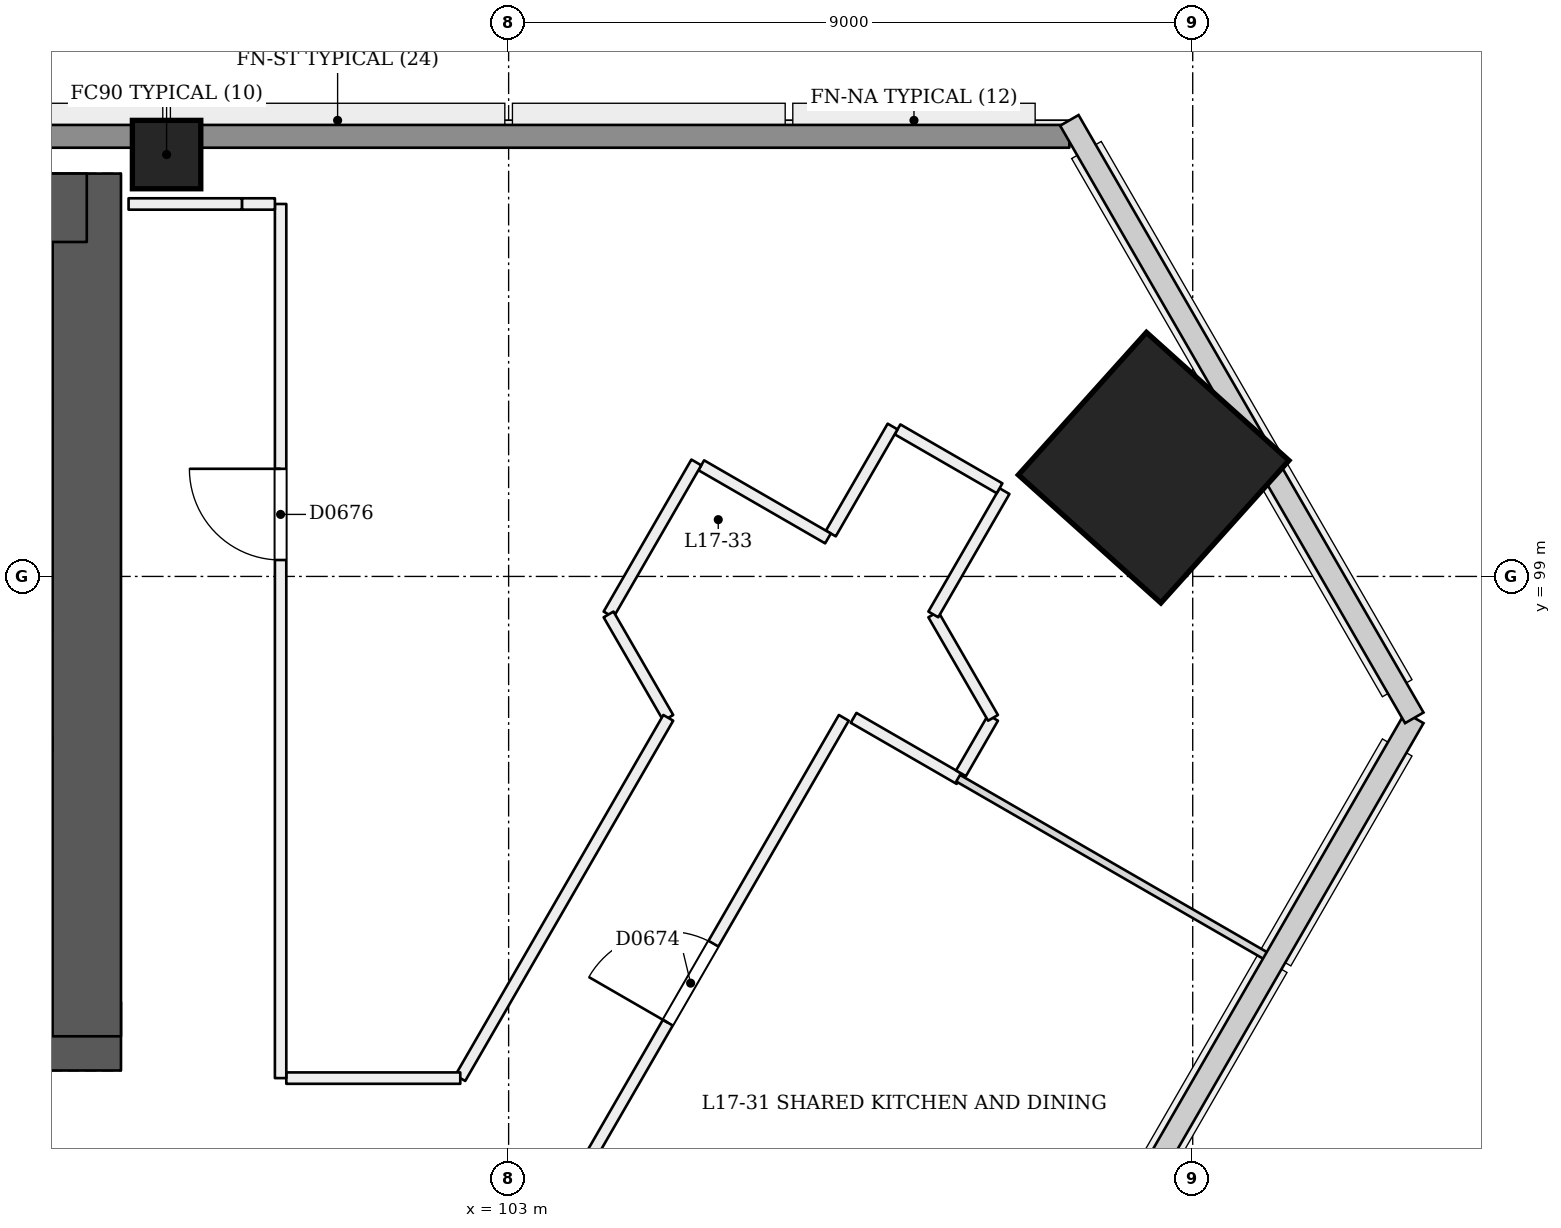
"""IFC4 building model, lengths in metres.
Left out: names, types, materials, properties, quantities, classifications, styles, units other than length and angle.
Written with IfcOpenShell. Run it as: python <this file> out.ifc"""

import sys

from ifc_helpers import new_model, si_unit, direction, frame, frame_2d, origin, origin_2d, place, context, subcontext, project, spatial, rectangle, extrude, element, fill, save


model = new_model("IFC4")
c1 = context("Model", 3, precision=1e-05, world=origin(), true_north=direction((0.0, 1.0)))
c2 = subcontext(c1, "Body", "Model", "MODEL_VIEW")
j1 = project(units=[si_unit("LENGTHUNIT", "METRE"), si_unit("PLANEANGLEUNIT", "RADIAN")], contexts=[c1])
p1 = place(None, origin())
s1 = spatial("IfcSite", under=j1, at=p1, CompositionType="ELEMENT")
p2 = place(p1, origin())
s2 = spatial("IfcBuilding", under=s1, at=p2, CompositionType="ELEMENT")
p3 = place(p2, frame((0.0, 0.0, 70.2)))
s3 = spatial("IfcBuildingStorey", under=s2, at=p3, CompositionType="ELEMENT", Elevation=70.2)
p4 = place(p3, frame((72.55, 92.95, 0.0), z_axis=(0.0, 0.0, 1.0), x_axis=(1.0, 0.0, 0.0)))
e1 = element("IfcWall", 1, at=p4, inside=s3, PredefinedType="SHEAR", context=c2, shape_type="SweptSolid", body=[
    extrude(rectangle(XDim=25.35, YDim=0.9, at=frame_2d((12.675, 0.0))), origin(), (0.0, 0.0, 1.0), 3.6),
])
p5 = place(p4, frame((1.25, 0.0, 0.0)))
e2 = element("IfcOpeningElement", 2, at=p5, cuts=e1, PredefinedType="OPENING", context=c2, shape_type="SweptSolid", body=[
    extrude(rectangle(XDim=1.2, YDim=2.1, at=frame_2d((0.6, 1.05))), frame((0.0, 0.46, 0.0), z_axis=(0.0, -1.0, 0.0), x_axis=(1.0, 0.0, 0.0)), (0.0, 0.0, 1.0), 0.921),
])
p6 = place(p4, frame((3.45, 0.0, 0.0)))
e3 = element("IfcOpeningElement", 3, at=p6, cuts=e1, PredefinedType="OPENING", context=c2, shape_type="SweptSolid", body=[
    extrude(rectangle(XDim=1.2, YDim=2.1, at=frame_2d((0.6, 1.05))), frame((0.0, 0.46, 0.0), z_axis=(0.0, -1.0, 0.0), x_axis=(1.0, 0.0, 0.0)), (0.0, 0.0, 1.0), 0.921),
])
p7 = place(p4, frame((13.45, 0.0, 0.0)))
e4 = element("IfcOpeningElement", 4, at=p7, cuts=e1, PredefinedType="OPENING", context=c2, shape_type="SweptSolid", body=[
    extrude(rectangle(XDim=1.2, YDim=2.1, at=frame_2d((0.6, 1.05))), frame((0.0, 0.46, 0.0), z_axis=(0.0, -1.0, 0.0), x_axis=(1.0, 0.0, 0.0)), (0.0, 0.0, 1.0), 0.921),
])
p8 = place(p4, frame((16.312, 0.0, 0.0)))
e5 = element("IfcOpeningElement", 5, at=p8, cuts=e1, PredefinedType="OPENING", context=c2, shape_type="SweptSolid", body=[
    extrude(rectangle(XDim=1.0, YDim=2.1, at=frame_2d((0.5, 1.05))), frame((0.0, 0.46, 0.0), z_axis=(0.0, -1.0, 0.0), x_axis=(1.0, 0.0, 0.0)), (0.0, 0.0, 1.0), 0.921),
])
p9 = place(p4, frame((19.75, 0.0, 0.0)))
e6 = element("IfcOpeningElement", 6, at=p9, cuts=e1, PredefinedType="OPENING", context=c2, shape_type="SweptSolid", body=[
    extrude(rectangle(XDim=1.0, YDim=2.1, at=frame_2d((0.5, 1.05))), frame((0.0, 0.46, 0.0), z_axis=(0.0, -1.0, 0.0), x_axis=(1.0, 0.0, 0.0)), (0.0, 0.0, 1.0), 0.921),
])
p10 = place(p4, frame((22.738, 0.0, 0.0)))
e7 = element("IfcOpeningElement", 7, at=p10, cuts=e1, PredefinedType="OPENING", context=c2, shape_type="SweptSolid", body=[
    extrude(rectangle(XDim=1.0, YDim=2.1, at=frame_2d((0.5, 1.05))), frame((0.0, 0.46, 0.0), z_axis=(0.0, -1.0, 0.0), x_axis=(1.0, 0.0, 0.0)), (0.0, 0.0, 1.0), 0.921),
])
p11 = place(p3, frame((97.45, 92.95, 0.0), z_axis=(0.0, 0.0, 1.0), x_axis=(0.0, 1.0, 0.0)))
e8 = element("IfcWall", 8, at=p11, inside=s3, PredefinedType="SHEAR", context=c2, shape_type="SweptSolid", body=[
    extrude(rectangle(XDim=11.35, YDim=0.9, at=frame_2d((5.675, 0.0))), origin(), (0.0, 0.0, 1.0), 3.6),
])
p12 = place(p3, frame((97.45, 103.85, 0.0), z_axis=(0.0, 0.0, 1.0), x_axis=(-1.0, 0.0, 0.0)))
e9 = element("IfcWall", 9, at=p12, inside=s3, PredefinedType="SHEAR", context=c2, shape_type="SweptSolid", body=[
    extrude(rectangle(XDim=25.35, YDim=0.9, at=frame_2d((12.675, 0.0))), origin(), (0.0, 0.0, 1.0), 3.6),
])
p13 = place(p3, frame((111.52, 100.42, 0.0), z_axis=(-0.028401814599, 0.009218727412, 0.999554076572), x_axis=(0.500759961853, -0.865301221788, 0.022209371367)))
e10 = element("IfcColumn", 10, at=p13, inside=s3, PredefinedType="COLUMN", context=c2, shape_type="SweptSolid", body=[
    extrude(rectangle(XDim=2.52, YDim=2.52, at=origin_2d()), origin(), (0.0, 0.0, 1.0), 3.602),
])
p14 = place(p3, frame((98.5, 104.55, 0.0), z_axis=(0.0, 0.0, 1.0), x_axis=(1.0, 0.0, 0.0)))
e11 = element("IfcColumn", 11, at=p14, inside=s3, PredefinedType="COLUMN", context=c2, shape_type="SweptSolid", body=[
    extrude(rectangle(XDim=0.9, YDim=0.9, at=origin_2d()), origin(), (0.0, 0.0, 1.0), 3.6),
])
p15 = place(p3, frame((85.785, 59.686, 0.0), z_axis=(0.0, 0.0, 1.0), x_axis=(0.500002288388, 0.866024082579, 0.0)))
e12 = element("IfcWall", 12, at=p15, inside=s3, PredefinedType="PARTITIONING", context=c2, shape_type="SweptSolid", body=[
    extrude(rectangle(XDim=43.248, YDim=0.15, at=frame_2d((21.624, 0.0))), origin(), (0.0, 0.0, 1.0), 2.7),
])
p16 = place(p15, frame((0.256, 0.0, 0.0)))
e13 = element("IfcOpeningElement", 13, at=p16, cuts=e12, PredefinedType="OPENING", context=c2, shape_type="SweptSolid", body=[
    extrude(rectangle(XDim=1.2, YDim=2.1, at=frame_2d((0.6, 1.05))), frame((0.0, 0.085, 0.0), z_axis=(0.0, -1.0, 0.0), x_axis=(1.0, 0.0, 0.0)), (0.0, 0.0, 1.0), 0.171),
])
p17 = place(p15, frame((4.229, 0.0, 0.0)))
e14 = element("IfcOpeningElement", 14, at=p17, cuts=e12, PredefinedType="OPENING", context=c2, shape_type="SweptSolid", body=[
    extrude(rectangle(XDim=1.0, YDim=2.1, at=frame_2d((0.5, 1.05))), frame((0.0, 0.085, 0.0), z_axis=(0.0, -1.0, 0.0), x_axis=(1.0, 0.0, 0.0)), (0.0, 0.0, 1.0), 0.171),
])
p18 = place(p15, frame((10.904, 0.0, 0.0)))
e15 = element("IfcOpeningElement", 15, at=p18, cuts=e12, PredefinedType="OPENING", context=c2, shape_type="SweptSolid", body=[
    extrude(rectangle(XDim=1.0, YDim=2.1, at=frame_2d((0.5, 1.05))), frame((0.0, 0.085, 0.0), z_axis=(0.0, -1.0, 0.0), x_axis=(1.0, 0.0, 0.0)), (0.0, 0.0, 1.0), 0.171),
])
p19 = place(p15, frame((13.345, 0.0, 0.0)))
e16 = element("IfcOpeningElement", 16, at=p19, cuts=e12, PredefinedType="OPENING", context=c2, shape_type="SweptSolid", body=[
    extrude(rectangle(XDim=1.0, YDim=2.1, at=frame_2d((0.5, 1.05))), frame((0.0, 0.085, 0.0), z_axis=(0.0, -1.0, 0.0), x_axis=(1.0, 0.0, 0.0)), (0.0, 0.0, 1.0), 0.171),
])
p20 = place(p15, frame((21.024, 0.0, 0.0)))
e17 = element("IfcOpeningElement", 17, at=p20, cuts=e12, PredefinedType="OPENING", context=c2, shape_type="SweptSolid", body=[
    extrude(rectangle(XDim=1.2, YDim=2.1, at=frame_2d((0.6, 1.05))), frame((0.0, 0.085, 0.0), z_axis=(0.0, -1.0, 0.0), x_axis=(1.0, 0.0, 0.0)), (0.0, 0.0, 1.0), 0.171),
])
p21 = place(p15, frame((28.904, 0.0, 0.0)))
e18 = element("IfcOpeningElement", 18, at=p21, cuts=e12, PredefinedType="OPENING", context=c2, shape_type="SweptSolid", body=[
    extrude(rectangle(XDim=1.0, YDim=2.1, at=frame_2d((0.5, 1.05))), frame((0.0, 0.085, 0.0), z_axis=(0.0, -1.0, 0.0), x_axis=(1.0, 0.0, 0.0)), (0.0, 0.0, 1.0), 0.171),
])
p22 = place(p15, frame((31.195, 0.0, 0.0)))
e19 = element("IfcOpeningElement", 19, at=p22, cuts=e12, PredefinedType="OPENING", context=c2, shape_type="SweptSolid", body=[
    extrude(rectangle(XDim=1.1, YDim=2.1, at=frame_2d((0.55, 1.05))), frame((0.0, 0.085, 0.0), z_axis=(0.0, -1.0, 0.0), x_axis=(1.0, 0.0, 0.0)), (0.0, 0.0, 1.0), 0.171),
])
p23 = place(p15, frame((38.618, 0.0, 0.0)))
e20 = element("IfcOpeningElement", 20, at=p23, cuts=e12, PredefinedType="OPENING", context=c2, shape_type="SweptSolid", body=[
    extrude(rectangle(XDim=1.2, YDim=2.1, at=frame_2d((0.6, 1.05))), frame((0.0, 0.085, 0.0), z_axis=(0.0, -1.0, 0.0), x_axis=(1.0, 0.0, 0.0)), (0.0, 0.0, 1.0), 0.171),
])
p24 = place(p3, frame((107.538, 97.14, 0.0), z_axis=(0.0, 0.0, 1.0), x_axis=(0.866021328928, -0.500007057792, 0.0)))
e21 = element("IfcWall", 21, at=p24, inside=s3, PredefinedType="PARTITIONING", context=c2, shape_type="SweptSolid", body=[
    extrude(rectangle(XDim=1.609, YDim=0.15, at=frame_2d((0.804, 0.0))), origin(), (0.0, 0.0, 1.0), 3.1),
])
p25 = place(p3, frame((108.951, 96.41, 0.0), z_axis=(0.0, 0.0, 1.0), x_axis=(0.499973348067, 0.866040790738, 0.0)))
e22 = element("IfcWall", 22, at=p25, inside=s3, PredefinedType="PARTITIONING", context=c2, shape_type="SweptSolid", body=[
    extrude(rectangle(XDim=0.842, YDim=0.15, at=frame_2d((0.421, 0.0))), origin(), (0.0, 0.0, 1.0), 3.1),
])
p26 = place(p3, frame((109.373, 97.14, 0.0), z_axis=(0.0, 0.0, 1.0), x_axis=(-0.500000501253, 0.866025114386, 0.0)))
e23 = element("IfcWall", 23, at=p26, inside=s3, PredefinedType="PARTITIONING", context=c2, shape_type="SweptSolid", body=[
    extrude(rectangle(XDim=1.571, YDim=0.15, at=frame_2d((0.785, 0.0))), origin(), (0.0, 0.0, 1.0), 3.1),
])
p27 = place(p3, frame((108.587, 98.5, 0.0), z_axis=(0.0, 0.0, 1.0), x_axis=(0.499951854219, 0.86605319898, 0.0)))
e24 = element("IfcWall", 24, at=p27, inside=s3, PredefinedType="PARTITIONING", context=c2, shape_type="SweptSolid", body=[
    extrude(rectangle(XDim=1.873, YDim=0.15, at=frame_2d((0.937, 0.0))), origin(), (0.0, 0.0, 1.0), 3.1),
])
p28 = place(p3, frame((109.459, 100.16, 0.0), z_axis=(0.0, 0.0, 1.0), x_axis=(-0.865975732936, 0.500086022567, 0.0)))
e25 = element("IfcWall", 25, at=p28, inside=s3, PredefinedType="PARTITIONING", context=c2, shape_type="SweptSolid", body=[
    extrude(rectangle(XDim=1.55, YDim=0.15, at=frame_2d((0.775, 0.0))), origin(), (0.0, 0.0, 1.0), 3.1),
])
p29 = place(p3, frame((108.052, 100.972, 0.0), z_axis=(0.0, 0.0, 1.0), x_axis=(-0.500017246033, -0.866015446554, 0.0)))
e26 = element("IfcWall", 26, at=p29, inside=s3, PredefinedType="PARTITIONING", context=c2, shape_type="SweptSolid", body=[
    extrude(rectangle(XDim=1.625, YDim=0.15, at=frame_2d((0.812, 0.0))), origin(), (0.0, 0.0, 1.0), 3.1),
])
p30 = place(p3, frame((107.201, 99.5, 0.0), z_axis=(0.0, 0.0, 1.0), x_axis=(-0.866033512162, 0.499985955615, 0.0)))
e27 = element("IfcWall", 27, at=p30, inside=s3, PredefinedType="PARTITIONING", context=c2, shape_type="SweptSolid", body=[
    extrude(rectangle(XDim=1.925, YDim=0.15, at=frame_2d((0.962, 0.0))), origin(), (0.0, 0.0, 1.0), 3.1),
])
p31 = place(p3, frame((105.469, 100.5, 0.0), z_axis=(0.0, 0.0, 1.0), x_axis=(-0.500027479704, -0.866009537788, 0.0)))
e28 = element("IfcWall", 28, at=p31, inside=s3, PredefinedType="PARTITIONING", context=c2, shape_type="SweptSolid", body=[
    extrude(rectangle(XDim=2.309, YDim=0.15, at=frame_2d((1.155, 0.0))), origin(), (0.0, 0.0, 1.0), 3.1),
])
p32 = place(p3, frame((104.315, 98.5, 0.0), z_axis=(0.0, 0.0, 1.0), x_axis=(0.500000501253, -0.866025114386, 0.0)))
e29 = element("IfcWall", 29, at=p32, inside=s3, PredefinedType="PARTITIONING", context=c2, shape_type="SweptSolid", body=[
    extrude(rectangle(XDim=1.571, YDim=0.15, at=frame_2d((0.785, 0.0))), origin(), (0.0, 0.0, 1.0), 3.1),
])
p33 = place(p3, frame((105.1, 97.14, 0.0), z_axis=(0.0, 0.0, 1.0), x_axis=(-0.499977311951, -0.866038502339, 0.0)))
e30 = element("IfcWall", 30, at=p33, inside=s3, PredefinedType="PARTITIONING", context=c2, shape_type="SweptSolid", body=[
    extrude(rectangle(XDim=5.473, YDim=0.15, at=frame_2d((2.736, 0.0))), origin(), (0.0, 0.0, 1.0), 3.1),
])
p34 = place(p3, frame((102.364, 92.4, 0.0), z_axis=(0.0, 0.0, 1.0), x_axis=(-1.0, 0.0, 0.0)))
e31 = element("IfcWall", 31, at=p34, inside=s3, PredefinedType="PARTITIONING", context=c2, shape_type="SweptSolid", body=[
    extrude(rectangle(XDim=2.289, YDim=0.15, at=frame_2d((1.145, 0.0))), origin(), (0.0, 0.0, 1.0), 3.1),
])
p35 = place(p3, frame((100.0, 92.4, 0.0), z_axis=(0.0, 0.0, 1.0), x_axis=(0.0, 1.0, 0.0)))
e32 = element("IfcWall", 32, at=p35, inside=s3, PredefinedType="PARTITIONING", context=c2, shape_type="SweptSolid", body=[
    extrude(rectangle(XDim=11.5, YDim=0.15, at=frame_2d((5.75, 0.0))), origin(), (0.0, 0.0, 1.0), 2.6),
])
p36 = place(p35, frame((6.816, 0.0, 0.0)))
e33 = element("IfcOpeningElement", 33, at=p36, cuts=e32, PredefinedType="OPENING", context=c2, shape_type="SweptSolid", body=[
    extrude(rectangle(XDim=1.2, YDim=2.1, at=frame_2d((0.6, 1.05))), frame((0.0, 0.085, 0.0), z_axis=(0.0, -1.0, 0.0), x_axis=(1.0, 0.0, 0.0)), (0.0, 0.0, 1.0), 0.171),
])
p37 = place(p3, frame((99.925, 103.9, 0.0), z_axis=(0.0, 0.0, 1.0), x_axis=(-1.0, 0.0, 0.0)))
e34 = element("IfcWall", 34, at=p37, inside=s3, PredefinedType="PARTITIONING", context=c2, shape_type="SweptSolid", body=[
    extrude(rectangle(XDim=0.434, YDim=0.15, at=frame_2d((0.217, 0.0))), origin(), (0.0, 0.0, 1.0), 2.6),
])
p38 = place(p3, frame((99.491, 103.9, 0.0), z_axis=(0.0, 0.0, 1.0), x_axis=(-1.0, 0.0, 0.0)))
e35 = element("IfcWall", 35, at=p38, inside=s3, PredefinedType="PARTITIONING", context=c2, shape_type="SweptSolid", body=[
    extrude(rectangle(XDim=1.491, YDim=0.15, at=frame_2d((0.746, 0.0))), origin(), (0.0, 0.0, 1.0), 3.1),
])
p39 = place(p3, frame((113.002, 93.985, 0.0), z_axis=(0.0, 0.0, 1.0), x_axis=(-0.866015897305, 0.500016465344, 0.0)))
e36 = element("IfcWall", 36, at=p39, inside=s3, PredefinedType="PARTITIONING", context=c2, shape_type="SweptSolid", body=[
    extrude(rectangle(XDim=4.72, YDim=0.1, at=frame_2d((2.36, 0.0))), origin(), (0.0, 0.0, 1.0), 2.6),
])
p40 = place(p3, frame((59.623, 104.79, 0.0), z_axis=(0.0, 0.0, 1.0), x_axis=(1.0, 0.0, 0.0)))
e37 = element("IfcWall", 37, at=p40, inside=s3, PredefinedType="SOLIDWALL", context=c2, shape_type="SweptSolid", body=[
    extrude(rectangle(XDim=50.754, YDim=0.3, at=frame_2d((25.377, 0.0))), origin(), (0.0, 0.0, 1.0), 2.6),
])
p41 = place(p23, origin())
e38 = element("IfcDoor", 38, at=p41, inside=s3, OperationType="SINGLE_SWING_LEFT", PredefinedType="NOTDEFINED", context=c2, shape_type="SweptSolid", body=[
    extrude(rectangle(XDim=1.2, YDim=2.1, at=frame_2d((0.6, 1.05))), frame((0.0, 0.025, 0.0), z_axis=(0.0, -1.0, 0.0), x_axis=(1.0, 0.0, 0.0)), (0.0, 0.0, 1.0), 0.05),
])
fill(e20, e38)
p42 = place(p36, origin())
e39 = element("IfcDoor", 39, at=p42, inside=s3, OperationType="SINGLE_SWING_RIGHT", PredefinedType="NOTDEFINED", context=c2, shape_type="SweptSolid", body=[
    extrude(rectangle(XDim=1.2, YDim=2.1, at=frame_2d((0.6, 1.05))), frame((0.0, 0.025, 0.0), z_axis=(0.0, -1.0, 0.0), x_axis=(1.0, 0.0, 0.0)), (0.0, 0.0, 1.0), 0.05),
])
fill(e33, e39)
save(model, sys.argv[1])
